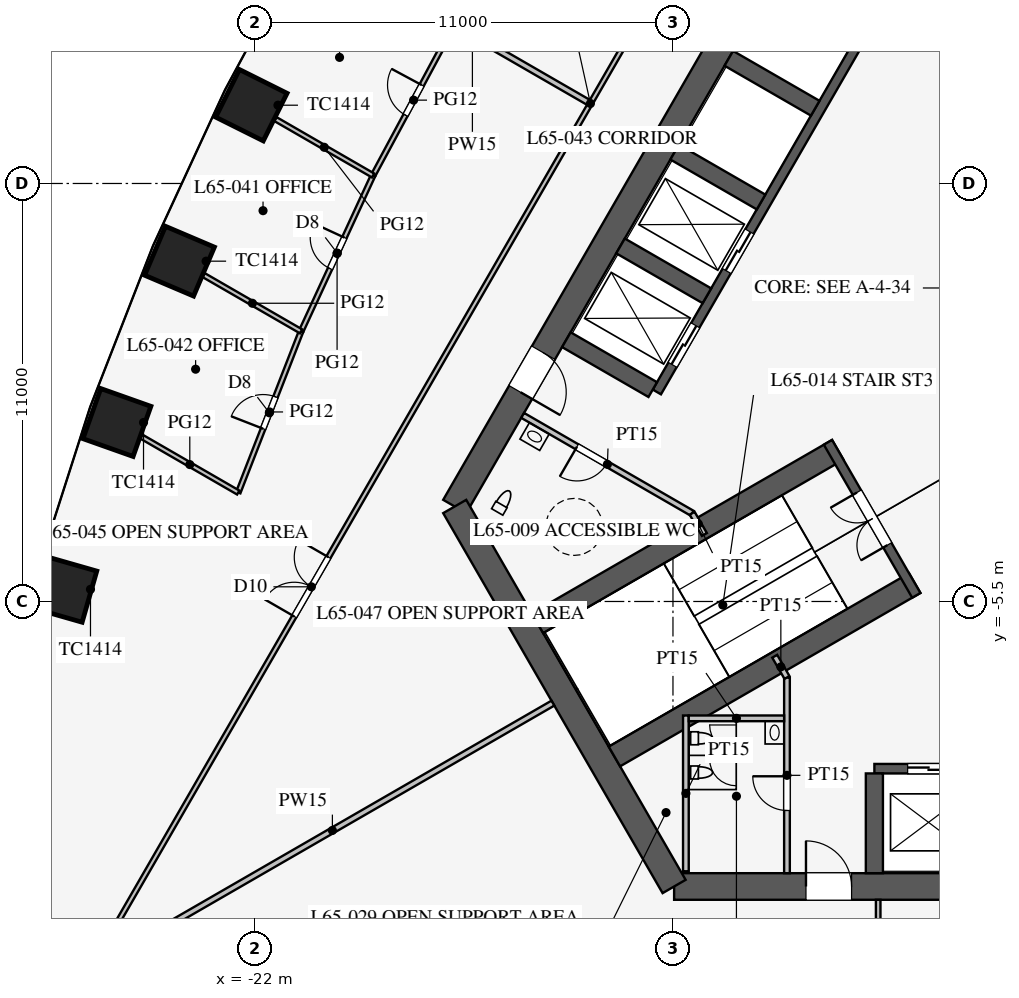
"""IFC4 building model, lengths in metres.
Left out: names, types, materials, properties, quantities, classifications, styles, units other than length and angle.
Written with IfcOpenShell. Run it as: python <this file> out.ifc"""

import sys

from ifc_helpers import new_model, si_unit, direction, frame, frame_2d, origin, origin_2d, place, context, subcontext, project, spatial, rectangle, extrude, element, fill, save


model = new_model("IFC4")
c1 = context("Model", 3, precision=1e-05, world=origin(), true_north=direction((0.0, 1.0)))
c2 = subcontext(c1, "Body", "Model", "MODEL_VIEW")
j1 = project(units=[si_unit("LENGTHUNIT", "METRE"), si_unit("PLANEANGLEUNIT", "RADIAN")], contexts=[c1])
p1 = place(None, origin())
s1 = spatial("IfcSite", under=j1, at=p1, CompositionType="ELEMENT")
p2 = place(p1, origin())
s2 = spatial("IfcBuilding", under=s1, at=p2, CompositionType="ELEMENT")
p3 = place(p2, frame((0.0, 0.0, 284.7)))
s3 = spatial("IfcBuildingStorey", under=s2, at=p3, CompositionType="ELEMENT", Elevation=284.7)
for number, where, z_axis, x_axis in (
    (1, (-22.094, 7.56, 0.0), (0.0, 0.0, 1.0), (-0.447, -0.895, 0.0)),
    (2, (-23.985, 3.455, 0.0), (0.0, 0.0, 1.0), (-0.391, -0.92, 0.0)),
    (3, (-25.632, -0.79, 0.0), (0.0, 0.0, 1.0), (-0.334, -0.942, 0.0)),
    (4, (-27.027, -5.18, 0.0), (0.0, 0.0, 1.0), (-0.275, -0.961, 0.0)),
):
    element("IfcColumn", number, at=place(p3, frame(where, z_axis=z_axis, x_axis=x_axis)), inside=s3, PredefinedType="COLUMN", context=c2, shape_type="SweptSolid", body=[
        extrude(rectangle(XDim=1.4, YDim=1.4, at=origin_2d()), origin(), (0.0, 0.0, 1.0), 4.2),
    ])
p4 = place(p3, frame((-10.97, -13.0, 0.0), z_axis=(0.0, 0.0, 1.0), x_axis=(1.0, 0.0, 0.0)))
e5 = element("IfcWall", 5, at=p4, inside=s3, PredefinedType="SHEAR", context=c2, shape_type="SweptSolid", body=[
    extrude(rectangle(XDim=21.939, YDim=0.7, at=frame_2d((10.97, 0.0))), origin(), (0.0, 0.0, 1.0), 4.2),
])
p5 = place(p4, frame((17.27, 0.0, 0.0)))
e6 = element("IfcOpeningElement", 6, at=p5, cuts=e5, PredefinedType="OPENING", context=c2, shape_type="SweptSolid", body=[
    extrude(rectangle(XDim=1.2, YDim=2.1, at=frame_2d((0.6, 1.05))), frame((0.0, 0.36, 0.0), z_axis=(0.0, -1.0, 0.0), x_axis=(1.0, 0.0, 0.0)), (0.0, 0.0, 1.0), 0.72),
])
p6 = place(p4, frame((3.47, 0.0, 0.0)))
e7 = element("IfcOpeningElement", 7, at=p6, cuts=e5, PredefinedType="OPENING", context=c2, shape_type="SweptSolid", body=[
    extrude(rectangle(XDim=1.2, YDim=2.1, at=frame_2d((0.6, 1.05))), frame((0.0, 0.36, 0.0), z_axis=(0.0, -1.0, 0.0), x_axis=(1.0, 0.0, 0.0)), (0.0, 0.0, 1.0), 0.72),
])
p7 = place(p3, frame((-5.773, 16.0, 0.0), z_axis=(0.0, 0.0, 1.0), x_axis=(-0.500002442456, -0.866023993627, 0.0)))
e8 = element("IfcWall", 8, at=p7, inside=s3, PredefinedType="SHEAR", context=c2, shape_type="SweptSolid", body=[
    extrude(rectangle(XDim=21.939, YDim=0.7, at=frame_2d((10.97, 0.0))), origin(), (0.0, 0.0, 1.0), 4.2),
])
p8 = place(p7, frame((17.27, 0.0, 0.0)))
e9 = element("IfcOpeningElement", 9, at=p8, cuts=e8, PredefinedType="OPENING", context=c2, shape_type="SweptSolid", body=[
    extrude(rectangle(XDim=1.2, YDim=2.1, at=frame_2d((0.6, 1.05))), frame((0.0, 0.36, 0.0), z_axis=(0.0, -1.0, 0.0), x_axis=(1.0, 0.0, 0.0)), (0.0, 0.0, 1.0), 0.72),
])
p9 = place(p7, frame((3.47, 0.0, 0.0)))
e10 = element("IfcOpeningElement", 10, at=p9, cuts=e8, PredefinedType="OPENING", context=c2, shape_type="SweptSolid", body=[
    extrude(rectangle(XDim=1.2, YDim=2.1, at=frame_2d((0.6, 1.05))), frame((0.0, 0.36, 0.0), z_axis=(0.0, -1.0, 0.0), x_axis=(1.0, 0.0, 0.0)), (0.0, 0.0, 1.0), 0.72),
])
p10 = place(p3, frame((-16.743, -3.0, 0.0), z_axis=(0.0, 0.0, 1.0), x_axis=(0.499995765644, -0.866027848477, 0.0)))
e11 = element("IfcWall", 11, at=p10, inside=s3, PredefinedType="SHEAR", context=c2, shape_type="SweptSolid", body=[
    extrude(rectangle(XDim=11.547, YDim=0.7, at=frame_2d((5.773, 0.0))), origin(), (0.0, 0.0, 1.0), 4.2),
])
p11 = place(p3, frame((-5.7, -9.9, 0.0), z_axis=(0.0, 0.0, 1.0), x_axis=(1.0, 0.0, 0.0)))
e12 = element("IfcWall", 12, at=p11, inside=s3, PredefinedType="SHEAR", context=c2, shape_type="SweptSolid", body=[
    extrude(rectangle(XDim=11.4, YDim=0.25, at=frame_2d((5.7, 0.0))), origin(), (0.0, 0.0, 1.0), 4.2),
])
p12 = place(p11, frame((0.875, 0.0, 0.0)))
e13 = element("IfcOpeningElement", 13, at=p12, cuts=e12, PredefinedType="OPENING", context=c2, shape_type="SweptSolid", body=[
    extrude(rectangle(XDim=1.1, YDim=2.2, at=frame_2d((0.55, 1.1))), frame((0.0, 0.135, 0.0), z_axis=(0.0, -1.0, 0.0), x_axis=(1.0, 0.0, 0.0)), (0.0, 0.0, 1.0), 0.27),
])
p13 = place(p11, frame((3.725, 0.0, 0.0)))
e14 = element("IfcOpeningElement", 14, at=p13, cuts=e12, PredefinedType="OPENING", context=c2, shape_type="SweptSolid", body=[
    extrude(rectangle(XDim=1.1, YDim=2.2, at=frame_2d((0.55, 1.1))), frame((0.0, 0.135, 0.0), z_axis=(0.0, -1.0, 0.0), x_axis=(1.0, 0.0, 0.0)), (0.0, 0.0, 1.0), 0.27),
])
p14 = place(p11, frame((6.575, 0.0, 0.0)))
e15 = element("IfcOpeningElement", 15, at=p14, cuts=e12, PredefinedType="OPENING", context=c2, shape_type="SweptSolid", body=[
    extrude(rectangle(XDim=1.1, YDim=2.2, at=frame_2d((0.55, 1.1))), frame((0.0, 0.135, 0.0), z_axis=(0.0, -1.0, 0.0), x_axis=(1.0, 0.0, 0.0)), (0.0, 0.0, 1.0), 0.27),
])
p15 = place(p11, frame((9.425, 0.0, 0.0)))
e16 = element("IfcOpeningElement", 16, at=p15, cuts=e12, PredefinedType="OPENING", context=c2, shape_type="SweptSolid", body=[
    extrude(rectangle(XDim=1.1, YDim=2.2, at=frame_2d((0.55, 1.1))), frame((0.0, 0.135, 0.0), z_axis=(0.0, -1.0, 0.0), x_axis=(1.0, 0.0, 0.0)), (0.0, 0.0, 1.0), 0.27),
])
p16 = place(p3, frame((-5.7, -10.025, 0.0), z_axis=(0.0, 0.0, 1.0), x_axis=(0.0, -1.0, 0.0)))
e17 = element("IfcWall", 17, at=p16, inside=s3, PredefinedType="SHEAR", context=c2, shape_type="SweptSolid", body=[
    extrude(rectangle(XDim=2.625, YDim=0.45, at=frame_2d((1.312, 0.0))), origin(), (0.0, 0.0, 1.0), 4.2),
])
p17 = place(p3, frame((-5.724, 9.886, 0.0), z_axis=(0.0, 0.0, 1.0), x_axis=(-0.500001763848, -0.866024385424, 0.0)))
e18 = element("IfcWall", 18, at=p17, inside=s3, PredefinedType="SHEAR", context=c2, shape_type="SweptSolid", body=[
    extrude(rectangle(XDim=11.4, YDim=0.25, at=frame_2d((5.7, 0.0))), origin(), (0.0, 0.0, 1.0), 4.2),
])
p18 = place(p17, frame((6.525, 0.0, 0.0)))
e19 = element("IfcOpeningElement", 19, at=p18, cuts=e18, PredefinedType="OPENING", context=c2, shape_type="SweptSolid", body=[
    extrude(rectangle(XDim=1.2, YDim=2.2, at=frame_2d((0.6, 1.1))), frame((0.0, 0.135, 0.0), z_axis=(0.0, -1.0, 0.0), x_axis=(1.0, 0.0, 0.0)), (0.0, 0.0, 1.0), 0.27),
])
p19 = place(p17, frame((9.375, 0.0, 0.0)))
e20 = element("IfcOpeningElement", 20, at=p19, cuts=e18, PredefinedType="OPENING", context=c2, shape_type="SweptSolid", body=[
    extrude(rectangle(XDim=1.2, YDim=2.2, at=frame_2d((0.6, 1.1))), frame((0.0, 0.135, 0.0), z_axis=(0.0, -1.0, 0.0), x_axis=(1.0, 0.0, 0.0)), (0.0, 0.0, 1.0), 0.27),
])
for number, where, z_axis, x_axis in (
    (21, (-7.257, 7.481, 0.0), (0.0, 0.0, 1.0), (-0.866, 0.5, 0.0)),
    (22, (-8.682, 5.012, 0.0), (0.0, 0.0, 1.0), (-0.866, 0.5, 0.0)),
    (23, (-10.107, 2.544, 0.0), (0.0, 0.0, 1.0), (-0.866, 0.5, 0.0)),
    (24, (-11.532, 0.076, 0.0), (0.0, 0.0, 1.0), (-0.866, 0.5, 0.0)),
):
    element("IfcWall", number, at=place(p3, frame(where, z_axis=z_axis, x_axis=x_axis)), inside=s3, PredefinedType="SHEAR", context=c2, shape_type="SweptSolid", body=[
        extrude(rectangle(XDim=2.625, YDim=0.45, at=frame_2d((1.312, 0.0))), origin(), (0.0, 0.0, 1.0), 4.2),
    ])
for number, where, z_axis, x_axis in (
    (25, (-6.663, -1.509, 0.0), (0.0, 0.0, 1.0), (-0.866, -0.5, 0.0)),
    (26, (-4.638, -5.016, 0.0), (0.0, 0.0, 1.0), (-0.866, -0.5, 0.0)),
):
    element("IfcWall", number, at=place(p3, frame(where, z_axis=z_axis, x_axis=x_axis)), inside=s3, PredefinedType="SHEAR", context=c2, shape_type="SweptSolid", body=[
        extrude(rectangle(XDim=9.125, YDim=0.6, at=frame_2d((4.562, 0.0))), origin(), (0.0, 0.0, 1.0), 4.2),
    ])
p20 = place(p3, frame((-6.922, -1.312, 0.0), z_axis=(0.0, 0.0, 1.0), x_axis=(0.499984536904, -0.866034331223, 0.0)))
e27 = element("IfcWall", 27, at=p20, inside=s3, PredefinedType="SHEAR", context=c2, shape_type="SweptSolid", body=[
    extrude(rectangle(XDim=4.65, YDim=0.25, at=frame_2d((2.325, 0.0))), origin(), (0.0, 0.0, 1.0), 4.2),
])
p21 = place(p20, frame((1.525, 0.0, 0.0)))
e28 = element("IfcOpeningElement", 28, at=p21, cuts=e27, PredefinedType="OPENING", context=c2, shape_type="SweptSolid", body=[
    extrude(rectangle(XDim=1.6, YDim=2.1, at=frame_2d((0.8, 1.05))), frame((0.0, 0.135, 0.0), z_axis=(0.0, -1.0, 0.0), x_axis=(1.0, 0.0, 0.0)), (0.0, 0.0, 1.0), 0.27),
])
p22 = place(p3, frame((-8.0, -7.5, 0.0), z_axis=(0.0, 0.0, 1.0), x_axis=(0.0, -1.0, 0.0)))
e29 = element("IfcWall", 29, at=p22, inside=s3, PredefinedType="PARTITIONING", context=c2, shape_type="SweptSolid", body=[
    extrude(rectangle(XDim=5.15, YDim=0.15, at=frame_2d((2.575, 0.0))), origin(), (0.0, 0.0, 1.0), 4.0),
])
p23 = place(p22, frame((2.6, 0.0, 0.0)))
e30 = element("IfcOpeningElement", 30, at=p23, cuts=e29, PredefinedType="OPENING", context=c2, shape_type="SweptSolid", body=[
    extrude(rectangle(XDim=0.9, YDim=2.1, at=frame_2d((0.45, 1.05))), frame((0.0, 0.085, 0.0), z_axis=(0.0, -1.0, 0.0), x_axis=(1.0, 0.0, 0.0)), (0.0, 0.0, 1.0), 0.17),
])
p24 = place(p3, frame((-10.495, -3.178, 0.0), z_axis=(0.0, 0.0, 1.0), x_axis=(-0.866037967349, 0.499978238636, 0.0)))
e31 = element("IfcWall", 31, at=p24, inside=s3, PredefinedType="PARTITIONING", context=c2, shape_type="SweptSolid", body=[
    extrude(rectangle(XDim=5.15, YDim=0.15, at=frame_2d((2.575, 0.0))), origin(), (0.0, 0.0, 1.0), 4.0),
])
p25 = place(p24, frame((2.6, 0.0, 0.0)))
e32 = element("IfcOpeningElement", 32, at=p25, cuts=e31, PredefinedType="OPENING", context=c2, shape_type="SweptSolid", body=[
    extrude(rectangle(XDim=0.9, YDim=2.1, at=frame_2d((0.45, 1.05))), frame((0.0, 0.085, 0.0), z_axis=(0.0, -1.0, 0.0), x_axis=(1.0, 0.0, 0.0)), (0.0, 0.0, 1.0), 0.17),
])
for number, where, z_axis, x_axis in (
    (33, (-10.495, -3.178, 0.0), (0.0, 0.0, 1.0), (0.5, -0.866, 0.0)),
    (34, (-8.0, -7.5, 0.0), (0.0, 0.0, 1.0), (-0.5, 0.866, 0.0)),
):
    element("IfcWall", number, at=place(p3, frame(where, z_axis=z_axis, x_axis=x_axis)), inside=s3, PredefinedType="PARTITIONING", context=c2, shape_type="SweptSolid", body=[
        extrude(rectangle(XDim=0.645, YDim=0.15, at=frame_2d((0.323, 0.0))), origin(), (0.0, 0.0, 1.0), 4.0),
    ])
p26 = place(p3, frame((-10.66, -8.5, 0.0), z_axis=(0.0, 0.0, 1.0), x_axis=(0.0, -1.0, 0.0)))
e35 = element("IfcWall", 35, at=p26, inside=s3, PredefinedType="PARTITIONING", context=c2, shape_type="SweptSolid", body=[
    extrude(rectangle(XDim=4.1, YDim=0.15, at=frame_2d((2.05, 0.0))), origin(), (0.0, 0.0, 1.0), 4.0),
])
p27 = place(p3, frame((-8.075, -8.575, 0.0), z_axis=(0.0, 0.0, 1.0), x_axis=(-1.0, 0.0, 0.0)))
e36 = element("IfcWall", 36, at=p27, inside=s3, PredefinedType="PARTITIONING", context=c2, shape_type="SweptSolid", body=[
    extrude(rectangle(XDim=2.51, YDim=0.15, at=frame_2d((1.255, 0.0))), origin(), (0.0, 0.0, 1.0), 4.0),
])
p28 = place(p3, frame((-14.159, -8.175, 0.0), z_axis=(0.0, 0.0, 1.0), x_axis=(-0.866026905467, -0.499997399001, 0.0)))
e37 = element("IfcWall", 37, at=p28, inside=s3, PredefinedType="PARTITIONING", context=c2, shape_type="SweptSolid", body=[
    extrude(rectangle(XDim=13.4, YDim=0.15, at=frame_2d((6.7, 0.0))), origin(), (0.0, 0.0, 1.0), 2.5),
])
p29 = place(p3, frame((-5.6, -13.35, 0.0), z_axis=(0.0, 0.0, 1.0), x_axis=(0.0, -1.0, 0.0)))
e38 = element("IfcWall", 38, at=p29, inside=s3, PredefinedType="PARTITIONING", context=c2, shape_type="SweptSolid", body=[
    extrude(rectangle(XDim=3.2, YDim=0.12, at=frame_2d((1.6, 0.0))), origin(), (0.0, 0.0, 1.0), 2.9),
])
p30 = place(p3, frame((-13.224, 7.635, 0.0), z_axis=(0.0, 0.0, 1.0), x_axis=(-0.86602299963, 0.500004164094, 0.0)))
e39 = element("IfcWall", 39, at=p30, inside=s3, PredefinedType="PARTITIONING", context=c2, shape_type="SweptSolid", body=[
    extrude(rectangle(XDim=7.052, YDim=0.15, at=frame_2d((3.526, 0.0))), origin(), (0.0, 0.0, 1.0), 3.0),
])
p31 = place(p3, frame((-0.49, 29.571, 0.0), z_axis=(0.0, 0.0, 1.0), x_axis=(-0.499999496503, -0.866025694478, 0.0)))
e40 = element("IfcWall", 40, at=p31, inside=s3, PredefinedType="PARTITIONING", context=c2, shape_type="SweptSolid", body=[
    extrude(rectangle(XDim=50.728, YDim=0.12, at=frame_2d((25.364, 0.0))), origin(), (0.0, 0.0, 1.0), 2.9),
])
p32 = place(p31, frame((9.8, 0.0, 0.15)))
e41 = element("IfcOpeningElement", 41, at=p32, cuts=e40, PredefinedType="OPENING", context=c2, shape_type="SweptSolid", body=[
    extrude(rectangle(XDim=1.8, YDim=2.1, at=frame_2d((0.9, 1.05))), frame((0.0, 0.07, 0.0), z_axis=(0.0, -1.0, 0.0), x_axis=(1.0, 0.0, 0.0)), (0.0, 0.0, 1.0), 0.14),
])
p33 = place(p31, frame((39.15, 0.0, 0.15)))
e42 = element("IfcOpeningElement", 42, at=p33, cuts=e40, PredefinedType="OPENING", context=c2, shape_type="SweptSolid", body=[
    extrude(rectangle(XDim=1.8, YDim=2.1, at=frame_2d((0.9, 1.05))), frame((0.0, 0.07, 0.0), z_axis=(0.0, -1.0, 0.0), x_axis=(1.0, 0.0, 0.0)), (0.0, 0.0, 1.0), 0.14),
])
p34 = place(p3, frame((-16.759, 9.676, 0.0), z_axis=(0.0, 0.0, 1.0), x_axis=(-0.473524102582, -0.880780860529, 0.0)))
e43 = element("IfcWall", 43, at=p34, inside=s3, PredefinedType="PARTITIONING", context=c2, shape_type="SweptSolid", body=[
    extrude(rectangle(XDim=4.502, YDim=0.12, at=frame_2d((2.251, 0.0))), origin(), (0.0, 0.0, 1.0), 2.9),
])
p35 = place(p34, frame((1.8, 0.0, 0.15)))
e44 = element("IfcOpeningElement", 44, at=p35, cuts=e43, PredefinedType="OPENING", context=c2, shape_type="SweptSolid", body=[
    extrude(rectangle(XDim=0.9, YDim=2.1, at=frame_2d((0.45, 1.05))), frame((0.0, 0.07, 0.0), z_axis=(0.0, -1.0, 0.0), x_axis=(1.0, 0.0, 0.0)), (0.0, 0.0, 1.0), 0.14),
])
p36 = place(p3, frame((-18.891, 5.71, 0.0), z_axis=(0.0, 0.0, 1.0), x_axis=(-0.419335693458, -0.907831248742, 0.0)))
e45 = element("IfcWall", 45, at=p36, inside=s3, PredefinedType="PARTITIONING", context=c2, shape_type="SweptSolid", body=[
    extrude(rectangle(XDim=4.519, YDim=0.12, at=frame_2d((2.259, 0.0))), origin(), (0.0, 0.0, 1.0), 2.9),
])
p37 = place(p36, frame((1.8, 0.0, 0.15)))
e46 = element("IfcOpeningElement", 46, at=p37, cuts=e45, PredefinedType="OPENING", context=c2, shape_type="SweptSolid", body=[
    extrude(rectangle(XDim=0.9, YDim=2.1, at=frame_2d((0.45, 1.05))), frame((0.0, 0.07, 0.0), z_axis=(0.0, -1.0, 0.0), x_axis=(1.0, 0.0, 0.0)), (0.0, 0.0, 1.0), 0.14),
])
p38 = place(p3, frame((-20.786, 1.608, 0.0), z_axis=(0.0, 0.0, 1.0), x_axis=(-0.363212149153, -0.931706463811, 0.0)))
e47 = element("IfcWall", 47, at=p38, inside=s3, PredefinedType="PARTITIONING", context=c2, shape_type="SweptSolid", body=[
    extrude(rectangle(XDim=4.553, YDim=0.12, at=frame_2d((2.276, 0.0))), origin(), (0.0, 0.0, 1.0), 2.9),
])
p39 = place(p38, frame((1.85, 0.0, 0.15)))
e48 = element("IfcOpeningElement", 48, at=p39, cuts=e47, PredefinedType="OPENING", context=c2, shape_type="SweptSolid", body=[
    extrude(rectangle(XDim=0.9, YDim=2.1, at=frame_2d((0.45, 1.05))), frame((0.0, 0.07, 0.0), z_axis=(0.0, -1.0, 0.0), x_axis=(1.0, 0.0, 0.0)), (0.0, 0.0, 1.0), 0.14),
])
p40 = place(p3, frame((-22.439, -2.633, 0.0), z_axis=(0.0, 0.0, 1.0), x_axis=(-0.866019881867, 0.500009564119, 0.0)))
e49 = element("IfcWall", 49, at=p40, inside=s3, PredefinedType="PARTITIONING", context=c2, shape_type="SweptSolid", body=[
    extrude(rectangle(XDim=2.944, YDim=0.12, at=frame_2d((1.472, 0.0))), origin(), (0.0, 0.0, 1.0), 2.8),
])
p41 = place(p3, frame((-18.891, 5.71, 0.0), z_axis=(0.0, 0.0, 1.0), x_axis=(-0.866032134716, 0.499988341504, 0.0)))
e50 = element("IfcWall", 50, at=p41, inside=s3, PredefinedType="PARTITIONING", context=c2, shape_type="SweptSolid", body=[
    extrude(rectangle(XDim=2.967, YDim=0.12, at=frame_2d((1.484, 0.0))), origin(), (0.0, 0.0, 1.0), 2.9),
])
p42 = place(p3, frame((-20.786, 1.608, 0.0), z_axis=(0.0, 0.0, 1.0), x_axis=(-0.866056430242, 0.499946256749, 0.0)))
e51 = element("IfcWall", 51, at=p42, inside=s3, PredefinedType="PARTITIONING", context=c2, shape_type="SweptSolid", body=[
    extrude(rectangle(XDim=2.959, YDim=0.12, at=frame_2d((1.479, 0.0))), origin(), (0.0, 0.0, 1.0), 2.9),
])
p43 = place(p23, frame((0.9, 0.0, 0.0), z_axis=(0.0, 0.0, 1.0), x_axis=(-1.0, 0.0, 0.0)))
e52 = element("IfcDoor", 52, at=p43, inside=s3, OperationType="SINGLE_SWING_RIGHT", PredefinedType="DOOR", context=c2, shape_type="SweptSolid", body=[
    extrude(rectangle(XDim=0.9, YDim=2.1, at=frame_2d((0.45, 1.05))), frame((0.0, 0.025, 0.0), z_axis=(0.0, -1.0, 0.0), x_axis=(1.0, 0.0, 0.0)), (0.0, 0.0, 1.0), 0.05),
])
fill(e30, e52)
p44 = place(p25, origin())
e53 = element("IfcDoor", 53, at=p44, inside=s3, OperationType="SINGLE_SWING_RIGHT", PredefinedType="DOOR", context=c2, shape_type="SweptSolid", body=[
    extrude(rectangle(XDim=0.9, YDim=2.1, at=frame_2d((0.45, 1.05))), frame((0.0, 0.025, 0.0), z_axis=(0.0, -1.0, 0.0), x_axis=(1.0, 0.0, 0.0)), (0.0, 0.0, 1.0), 0.05),
])
fill(e32, e53)
p45 = place(p21, frame((1.6, 0.0, 0.0), z_axis=(0.0, 0.0, 1.0), x_axis=(-1.0, 0.0, 0.0)))
e54 = element("IfcDoor", 54, at=p45, inside=s3, OperationType="DOUBLE_DOOR_SINGLE_SWING", PredefinedType="DOOR", context=c2, shape_type="SweptSolid", body=[
    extrude(rectangle(XDim=1.6, YDim=2.1, at=frame_2d((0.8, 1.05))), frame((0.0, 0.025, 0.0), z_axis=(0.0, -1.0, 0.0), x_axis=(1.0, 0.0, 0.0)), (0.0, 0.0, 1.0), 0.05),
])
fill(e28, e54)
p46 = place(p6, origin())
e55 = element("IfcDoor", 55, at=p46, inside=s3, OperationType="SINGLE_SWING_LEFT", PredefinedType="DOOR", context=c2, shape_type="SweptSolid", body=[
    extrude(rectangle(XDim=1.2, YDim=2.1, at=frame_2d((0.6, 1.05))), frame((0.0, 0.025, 0.0), z_axis=(0.0, -1.0, 0.0), x_axis=(1.0, 0.0, 0.0)), (0.0, 0.0, 1.0), 0.05),
])
fill(e7, e55)
p47 = place(p8, origin())
e56 = element("IfcDoor", 56, at=p47, inside=s3, OperationType="SINGLE_SWING_RIGHT", PredefinedType="DOOR", context=c2, shape_type="SweptSolid", body=[
    extrude(rectangle(XDim=1.2, YDim=2.1, at=frame_2d((0.6, 1.05))), frame((0.0, 0.025, 0.0), z_axis=(0.0, -1.0, 0.0), x_axis=(1.0, 0.0, 0.0)), (0.0, 0.0, 1.0), 0.05),
])
fill(e9, e56)
p48 = place(p35, frame((0.9, 0.0, 0.0), z_axis=(0.0, 0.0, 1.0), x_axis=(-1.0, 0.0, 0.0)))
e57 = element("IfcDoor", 57, at=p48, inside=s3, OperationType="SINGLE_SWING_RIGHT", PredefinedType="DOOR", context=c2, shape_type="SweptSolid", body=[
    extrude(rectangle(XDim=0.9, YDim=2.1, at=frame_2d((0.45, 1.05))), frame((0.0, 0.025, 0.0), z_axis=(0.0, -1.0, 0.0), x_axis=(1.0, 0.0, 0.0)), (0.0, 0.0, 1.0), 0.05),
])
fill(e44, e57)
p49 = place(p37, frame((0.9, 0.0, 0.0), z_axis=(0.0, 0.0, 1.0), x_axis=(-1.0, 0.0, 0.0)))
e58 = element("IfcDoor", 58, at=p49, inside=s3, OperationType="SINGLE_SWING_RIGHT", PredefinedType="DOOR", context=c2, shape_type="SweptSolid", body=[
    extrude(rectangle(XDim=0.9, YDim=2.1, at=frame_2d((0.45, 1.05))), frame((0.0, 0.025, 0.0), z_axis=(0.0, -1.0, 0.0), x_axis=(1.0, 0.0, 0.0)), (0.0, 0.0, 1.0), 0.05),
])
fill(e46, e58)
p50 = place(p39, frame((0.9, 0.0, 0.0), z_axis=(0.0, 0.0, 1.0), x_axis=(-1.0, 0.0, 0.0)))
e59 = element("IfcDoor", 59, at=p50, inside=s3, OperationType="SINGLE_SWING_LEFT", PredefinedType="DOOR", context=c2, shape_type="SweptSolid", body=[
    extrude(rectangle(XDim=0.9, YDim=2.1, at=frame_2d((0.45, 1.05))), frame((0.0, 0.025, 0.0), z_axis=(0.0, -1.0, 0.0), x_axis=(1.0, 0.0, 0.0)), (0.0, 0.0, 1.0), 0.05),
])
fill(e48, e59)
p51 = place(p33, frame((1.8, 0.0, 0.0), z_axis=(0.0, 0.0, 1.0), x_axis=(-1.0, 0.0, 0.0)))
e60 = element("IfcDoor", 60, at=p51, inside=s3, OperationType="DOUBLE_DOOR_SINGLE_SWING", PredefinedType="DOOR", context=c2, shape_type="SweptSolid", body=[
    extrude(rectangle(XDim=1.8, YDim=2.1, at=frame_2d((0.9, 1.05))), frame((0.0, 0.025, 0.0), z_axis=(0.0, -1.0, 0.0), x_axis=(1.0, 0.0, 0.0)), (0.0, 0.0, 1.0), 0.05),
])
fill(e42, e60)
p52 = place(p12, origin())
e61 = element("IfcDoor", 61, at=p52, inside=s3, OperationType="DOUBLE_DOOR_SLIDING", PredefinedType="DOOR", context=c2, shape_type="SweptSolid", body=[
    extrude(rectangle(XDim=1.1, YDim=2.2, at=frame_2d((0.55, 1.1))), frame((0.0, 0.025, 0.0), z_axis=(0.0, -1.0, 0.0), x_axis=(1.0, 0.0, 0.0)), (0.0, 0.0, 1.0), 0.05),
])
fill(e13, e61)
p53 = place(p18, origin())
e62 = element("IfcDoor", 62, at=p53, inside=s3, OperationType="DOUBLE_DOOR_SLIDING", PredefinedType="DOOR", context=c2, shape_type="SweptSolid", body=[
    extrude(rectangle(XDim=1.2, YDim=2.2, at=frame_2d((0.6, 1.1))), frame((0.0, 0.025, 0.0), z_axis=(0.0, -1.0, 0.0), x_axis=(1.0, 0.0, 0.0)), (0.0, 0.0, 1.0), 0.05),
])
fill(e19, e62)
p54 = place(p19, origin())
e63 = element("IfcDoor", 63, at=p54, inside=s3, OperationType="DOUBLE_DOOR_SLIDING", PredefinedType="DOOR", context=c2, shape_type="SweptSolid", body=[
    extrude(rectangle(XDim=1.2, YDim=2.2, at=frame_2d((0.6, 1.1))), frame((0.0, 0.025, 0.0), z_axis=(0.0, -1.0, 0.0), x_axis=(1.0, 0.0, 0.0)), (0.0, 0.0, 1.0), 0.05),
])
fill(e20, e63)
save(model, sys.argv[1])
